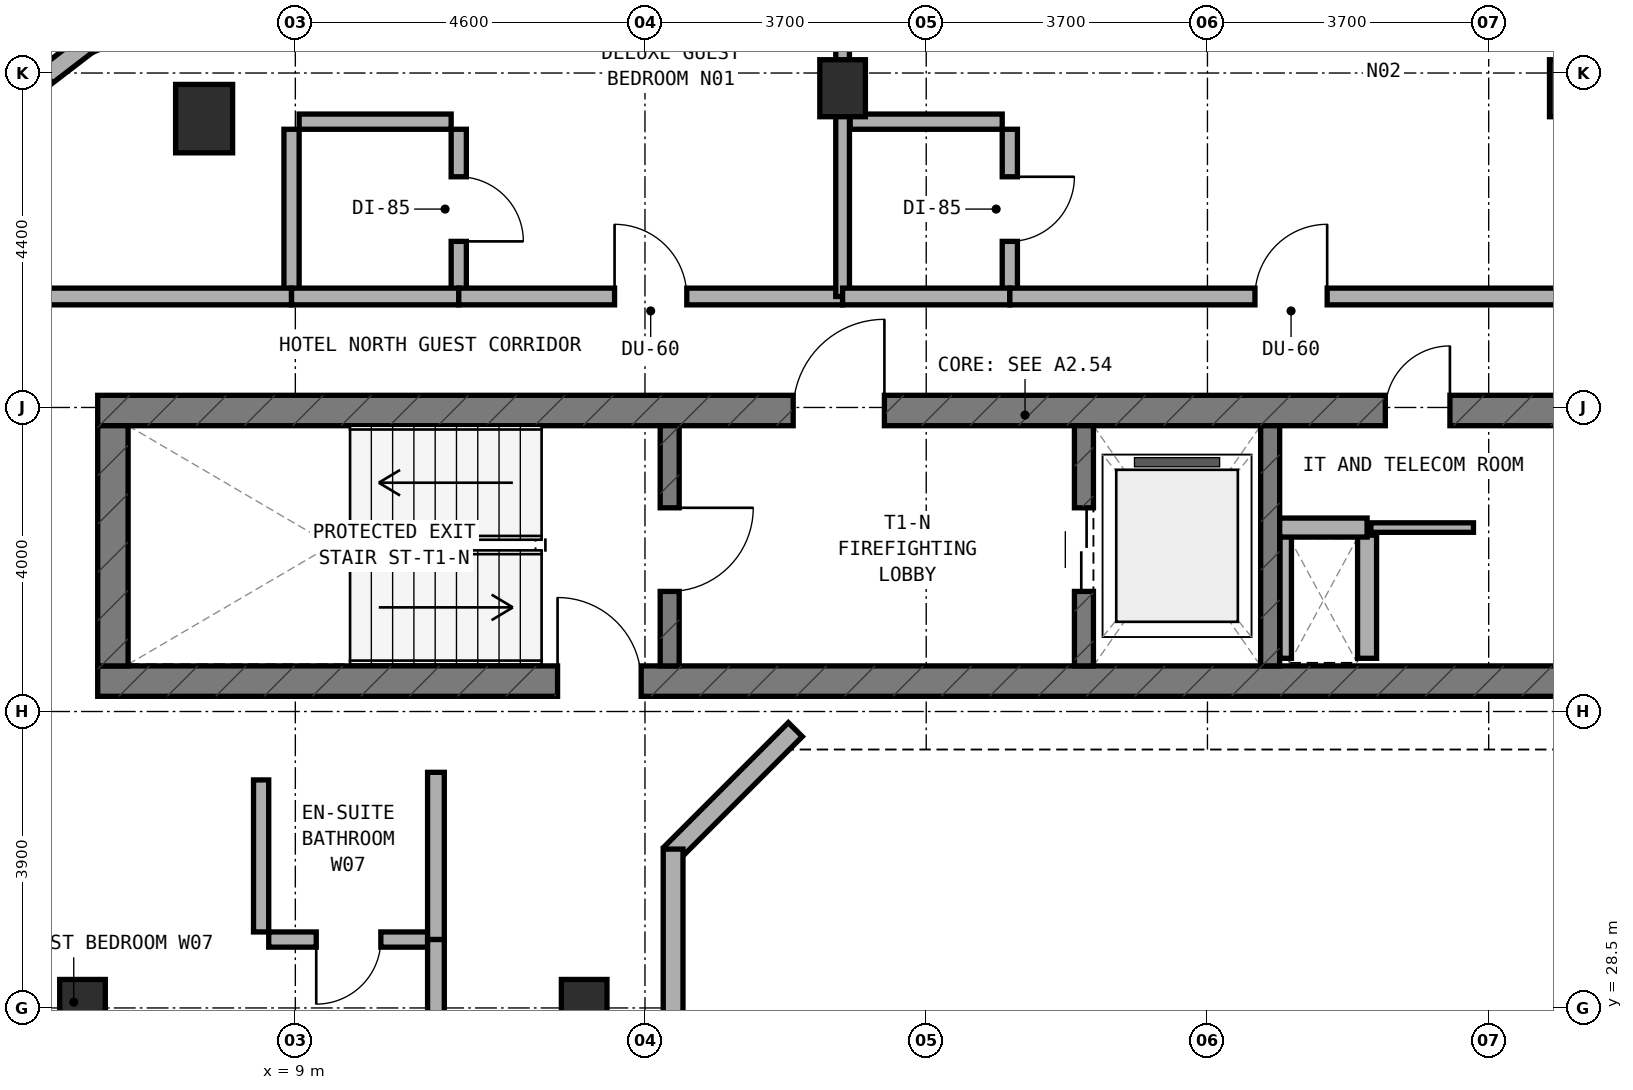
"""IFC4 building model, lengths in metres.
Left out: names, types, materials, properties, quantities, classifications, styles, units other than length and angle.
Written with IfcOpenShell. Run it as: python <this file> out.ifc"""

import sys

from ifc_helpers import new_model, si_unit, direction, frame, frame_2d, origin, origin_2d, place, context, subcontext, project, spatial, rectangle, extrude, element, fill, save


model = new_model("IFC4")
c1 = context("Model", 3, precision=1e-05, world=origin(), true_north=direction((0.0, 1.0)))
c2 = subcontext(c1, "Body", "Model", "MODEL_VIEW")
j1 = project(units=[si_unit("LENGTHUNIT", "METRE"), si_unit("PLANEANGLEUNIT", "RADIAN")], contexts=[c1])
p1 = place(None, origin())
s1 = spatial("IfcSite", under=j1, at=p1, CompositionType="ELEMENT")
p2 = place(p1, origin())
s2 = spatial("IfcBuilding", under=s1, at=p2, CompositionType="ELEMENT")
p3 = place(p2, frame((0.0, 0.0, 250.4)))
s3 = spatial("IfcBuildingStorey", under=s2, at=p3, CompositionType="ELEMENT", Elevation=250.4)
p4 = place(p3, frame((6.4, 32.8, 0.0), z_axis=(0.0, 0.0, 1.0), x_axis=(1.0, 0.0, 0.0)))
e1 = element("IfcWall", 1, at=p4, inside=s3, PredefinedType="SHEAR", context=c2, shape_type="SweptSolid", body=[
    extrude(rectangle(XDim=24.4, YDim=0.4, at=frame_2d((12.2, 0.0))), origin(), (0.0, 0.0, 1.0), 3.6),
])
p5 = place(p4, frame((6.05, 0.0, 0.0)))
e2 = element("IfcOpeningElement", 2, at=p5, cuts=e1, PredefinedType="OPENING", context=c2, shape_type="SweptSolid", body=[
    extrude(rectangle(XDim=1.1, YDim=2.15, at=frame_2d((0.55, 1.075))), frame((0.0, 0.21, 0.0), z_axis=(0.0, -1.0, 0.0), x_axis=(1.0, 0.0, 0.0)), (0.0, 0.0, 1.0), 0.42),
])
p6 = place(p3, frame((6.4, 36.36, 0.0), z_axis=(0.0, 0.0, 1.0), x_axis=(1.0, 0.0, 0.0)))
e3 = element("IfcWall", 3, at=p6, inside=s3, PredefinedType="SHEAR", context=c2, shape_type="SweptSolid", body=[
    extrude(rectangle(XDim=24.4, YDim=0.4, at=frame_2d((12.2, 0.0))), origin(), (0.0, 0.0, 1.0), 3.6),
])
p7 = place(p6, frame((9.15, 0.0, 0.0)))
e4 = element("IfcOpeningElement", 4, at=p7, cuts=e3, PredefinedType="OPENING", context=c2, shape_type="SweptSolid", body=[
    extrude(rectangle(XDim=1.2, YDim=2.15, at=frame_2d((0.6, 1.075))), frame((0.0, 0.21, 0.0), z_axis=(0.0, -1.0, 0.0), x_axis=(1.0, 0.0, 0.0)), (0.0, 0.0, 1.0), 0.42),
])
p8 = place(p6, frame((19.2, 0.0, 0.0)))
e5 = element("IfcOpeningElement", 5, at=p8, cuts=e3, PredefinedType="OPENING", context=c2, shape_type="SweptSolid", body=[
    extrude(rectangle(XDim=0.85, YDim=2.1, at=frame_2d((0.425, 1.05))), frame((0.0, 0.21, 0.0), z_axis=(0.0, -1.0, 0.0), x_axis=(1.0, 0.0, 0.0)), (0.0, 0.0, 1.0), 0.42),
])
p9 = place(p6, frame((16.94, 0.0, 0.0)))
e6 = element("IfcOpeningElement", 6, at=p9, cuts=e3, PredefinedType="OPENING", context=c2, shape_type="SweptSolid", body=[
    extrude(rectangle(XDim=0.85, YDim=2.1, at=frame_2d((0.425, 1.05))), frame((0.0, 0.21, 0.0), z_axis=(0.0, -1.0, 0.0), x_axis=(1.0, 0.0, 0.0)), (0.0, 0.0, 1.0), 0.42),
])
p10 = place(p3, frame((6.6, 33.0, 0.0), z_axis=(0.0, 0.0, 1.0), x_axis=(0.0, 1.0, 0.0)))
e7 = element("IfcWall", 7, at=p10, inside=s3, PredefinedType="SHEAR", context=c2, shape_type="SweptSolid", body=[
    extrude(rectangle(XDim=3.16, YDim=0.4, at=frame_2d((1.58, 0.0))), origin(), (0.0, 0.0, 1.0), 3.6),
])
p11 = place(p3, frame((13.925, 33.0, 0.0), z_axis=(0.0, 0.0, 1.0), x_axis=(0.0, 1.0, 0.0)))
e8 = element("IfcWall", 8, at=p11, inside=s3, PredefinedType="STANDARD", context=c2, shape_type="SweptSolid", body=[
    extrude(rectangle(XDim=3.16, YDim=0.25, at=frame_2d((1.58, 0.0))), origin(), (0.0, 0.0, 1.0), 3.32),
])
p12 = place(p11, frame((0.98, 0.0, 0.0)))
e9 = element("IfcOpeningElement", 9, at=p12, cuts=e8, PredefinedType="OPENING", context=c2, shape_type="SweptSolid", body=[
    extrude(rectangle(XDim=1.1, YDim=2.15, at=frame_2d((0.55, 1.075))), frame((0.0, 0.135, 0.0), z_axis=(0.0, -1.0, 0.0), x_axis=(1.0, 0.0, 0.0)), (0.0, 0.0, 1.0), 0.27),
])
p13 = place(p3, frame((19.375, 33.0, 0.0), z_axis=(0.0, 0.0, 1.0), x_axis=(0.0, 1.0, 0.0)))
e10 = element("IfcWall", 10, at=p13, inside=s3, PredefinedType="STANDARD", context=c2, shape_type="SweptSolid", body=[
    extrude(rectangle(XDim=3.16, YDim=0.25, at=frame_2d((1.58, 0.0))), origin(), (0.0, 0.0, 1.0), 3.32),
])
p14 = place(p13, frame((0.98, 0.0, 0.0)))
e11 = element("IfcOpeningElement", 11, at=p14, cuts=e10, PredefinedType="OPENING", context=c2, shape_type="SweptSolid", body=[
    extrude(rectangle(XDim=1.1, YDim=2.15, at=frame_2d((0.55, 1.075))), frame((0.0, 0.135, 0.0), z_axis=(0.0, -1.0, 0.0), x_axis=(1.0, 0.0, 0.0)), (0.0, 0.0, 1.0), 0.27),
])
p15 = place(p3, frame((21.825, 33.0, 0.0), z_axis=(0.0, 0.0, 1.0), x_axis=(0.0, 1.0, 0.0)))
e12 = element("IfcWall", 12, at=p15, inside=s3, PredefinedType="STANDARD", context=c2, shape_type="SweptSolid", body=[
    extrude(rectangle(XDim=3.16, YDim=0.25, at=frame_2d((1.58, 0.0))), origin(), (0.0, 0.0, 1.0), 3.32),
])
for number, where, z_axis, x_axis in (
    (13, (16.2, 40.6, 0.0), (0.0, 0.0, 1.0), (1.0, 0.0, 0.0)),
    (14, (25.8, 40.6, 0.0), (0.0, 0.0, 1.0), (1.0, 0.0, 0.0)),
    (15, (6.2, 28.5, 0.0), (0.0, 0.0, 1.0), (1.0, 0.0, 0.0)),
):
    element("IfcColumn", number, at=place(p3, frame(where, z_axis=z_axis, x_axis=x_axis)), inside=s3, PredefinedType="COLUMN", context=c2, shape_type="SweptSolid", body=[
        extrude(rectangle(XDim=0.6, YDim=0.75, at=origin_2d()), origin(), (0.0, 0.0, 1.0), 3.6),
    ])
p16 = place(p3, frame((7.8, 40.2, 0.0), z_axis=(0.0, 0.0, 1.0), x_axis=(1.0, 0.0, 0.0)))
e16 = element("IfcColumn", 16, at=p16, inside=s3, PredefinedType="COLUMN", context=c2, shape_type="SweptSolid", body=[
    extrude(rectangle(XDim=0.75, YDim=0.9, at=origin_2d()), origin(), (0.0, 0.0, 1.0), 3.6),
])
p17 = place(p3, frame((12.8, 28.5, 0.0), z_axis=(0.0, 0.0, 1.0), x_axis=(1.0, 0.0, 0.0)))
e17 = element("IfcColumn", 17, at=p17, inside=s3, PredefinedType="COLUMN", context=c2, shape_type="SweptSolid", body=[
    extrude(rectangle(XDim=0.6, YDim=0.75, at=origin_2d()), origin(), (0.0, 0.0, 1.0), 3.6),
])
p18 = place(p3, frame((6.997, 41.488, 0.0), z_axis=(0.0, 0.0, 1.0), x_axis=(-0.923681457047, -0.383161279238, 0.0)))
e18 = element("IfcWall", 18, at=p18, inside=s3, PredefinedType="STANDARD", context=c2, shape_type="SweptSolid", body=[
    extrude(rectangle(XDim=0.799, YDim=0.26, at=frame_2d((0.399, 0.0))), origin(), (0.0, 0.0, 1.0), 3.32),
])
for number, where, z_axis, x_axis in (
    (19, (6.299, 41.21, 0.0), (0.0, 0.0, 1.0), (-0.793, -0.609, 0.0)),
    (20, (5.697, 40.762, 0.0), (0.0, 0.0, 1.0), (-0.609, -0.793, 0.0)),
):
    element("IfcWall", number, at=place(p3, frame(where, z_axis=z_axis, x_axis=x_axis)), inside=s3, PredefinedType="STANDARD", context=c2, shape_type="SweptSolid", body=[
        extrude(rectangle(XDim=0.798, YDim=0.26, at=frame_2d((0.399, 0.0))), origin(), (0.0, 0.0, 1.0), 3.32),
    ])
p19 = place(p3, frame((15.578, 32.162, 0.0), z_axis=(0.0, 0.0, 1.0), x_axis=(-0.707053950914, -0.707159607512, 0.0)))
e21 = element("IfcWall", 21, at=p19, inside=s3, PredefinedType="STANDARD", context=c2, shape_type="SweptSolid", body=[
    extrude(rectangle(XDim=2.311, YDim=0.26, at=frame_2d((1.155, 0.0))), origin(), (0.0, 0.0, 1.0), 3.32),
])
p20 = place(p3, frame((13.97, 30.59, 0.0), z_axis=(0.0, 0.0, 1.0), x_axis=(0.0, -1.0, 0.0)))
e22 = element("IfcWall", 22, at=p20, inside=s3, PredefinedType="STANDARD", context=c2, shape_type="SweptSolid", body=[
    extrude(rectangle(XDim=11.18, YDim=0.26, at=frame_2d((5.59, 0.0))), origin(), (0.0, 0.0, 1.0), 3.32),
])
p21 = place(p20, frame((4.69, 0.0, 0.85)))
e23 = element("IfcOpeningElement", 23, at=p21, cuts=e22, PredefinedType="OPENING", context=c2, shape_type="SweptSolid", body=[
    extrude(rectangle(XDim=1.8, YDim=1.5, at=frame_2d((0.9, 0.75))), frame((0.0, 0.14, 0.0), z_axis=(0.0, -1.0, 0.0), x_axis=(1.0, 0.0, 0.0)), (0.0, 0.0, 1.0), 0.28),
])
p22 = place(p3, frame((22.03, 33.1, 0.0), z_axis=(0.0, 0.0, 1.0), x_axis=(0.0, 1.0, 0.0)))
e24 = element("IfcWall", 24, at=p22, inside=s3, PredefinedType="PARTITIONING", context=c2, shape_type="SweptSolid", body=[
    extrude(rectangle(XDim=1.62, YDim=0.15, at=frame_2d((0.81, 0.0))), origin(), (0.0, 0.0, 1.0), 3.32),
])
p23 = place(p3, frame((23.1, 33.1, 0.0), z_axis=(0.0, 0.0, 1.0), x_axis=(0.0, 1.0, 0.0)))
e25 = element("IfcWall", 25, at=p23, inside=s3, PredefinedType="SOLIDWALL", context=c2, shape_type="SweptSolid", body=[
    extrude(rectangle(XDim=1.62, YDim=0.25, at=frame_2d((0.81, 0.0))), origin(), (0.0, 0.0, 1.0), 3.32),
])
p24 = place(p3, frame((21.95, 34.82, 0.0), z_axis=(0.0, 0.0, 1.0), x_axis=(1.0, 0.0, 0.0)))
e26 = element("IfcWall", 26, at=p24, inside=s3, PredefinedType="SOLIDWALL", context=c2, shape_type="SweptSolid", body=[
    extrude(rectangle(XDim=1.15, YDim=0.25, at=frame_2d((0.575, 0.0))), origin(), (0.0, 0.0, 1.0), 3.32),
])
p25 = place(p3, frame((23.15, 34.82, 0.0), z_axis=(0.0, 0.0, 1.0), x_axis=(1.0, 0.0, 0.0)))
e27 = element("IfcWall", 27, at=p25, inside=s3, PredefinedType="PARTITIONING", context=c2, shape_type="SweptSolid", body=[
    extrude(rectangle(XDim=1.35, YDim=0.125, at=frame_2d((0.675, 0.0))), origin(), (0.0, 0.0, 1.0), 3.32),
])
p26 = place(p3, frame((11.15, 37.96, 0.0), z_axis=(0.0, 0.0, 1.0), x_axis=(0.0, 1.0, 0.0)))
e28 = element("IfcWall", 28, at=p26, inside=s3, PredefinedType="PLUMBINGWALL", context=c2, shape_type="SweptSolid", body=[
    extrude(rectangle(XDim=2.1, YDim=0.2, at=frame_2d((1.05, 0.0))), origin(), (0.0, 0.0, 1.0), 3.055),
])
p27 = place(p26, frame((0.625, 0.0, 0.0)))
e29 = element("IfcOpeningElement", 29, at=p27, cuts=e28, PredefinedType="OPENING", context=c2, shape_type="SweptSolid", body=[
    extrude(rectangle(XDim=0.85, YDim=2.1, at=frame_2d((0.425, 1.05))), frame((0.0, 0.11, 0.0), z_axis=(0.0, -1.0, 0.0), x_axis=(1.0, 0.0, 0.0)), (0.0, 0.0, 1.0), 0.22),
])
p28 = place(p3, frame((9.05, 40.16, 0.0), z_axis=(0.0, 0.0, 1.0), x_axis=(1.0, 0.0, 0.0)))
e30 = element("IfcWall", 30, at=p28, inside=s3, PredefinedType="PLUMBINGWALL", context=c2, shape_type="SweptSolid", body=[
    extrude(rectangle(XDim=2.0, YDim=0.2, at=frame_2d((1.0, 0.0))), origin(), (0.0, 0.0, 1.0), 3.015),
])
p29 = place(p3, frame((8.95, 37.96, 0.0), z_axis=(0.0, 0.0, 1.0), x_axis=(0.0, 1.0, 0.0)))
e31 = element("IfcWall", 31, at=p29, inside=s3, PredefinedType="PLUMBINGWALL", context=c2, shape_type="SweptSolid", body=[
    extrude(rectangle(XDim=2.1, YDim=0.2, at=frame_2d((1.05, 0.0))), origin(), (0.0, 0.0, 1.0), 3.055),
])
p30 = place(p3, frame((3.36, 37.86, 0.0), z_axis=(0.0, 0.0, 1.0), x_axis=(1.0, 0.0, 0.0)))
e32 = element("IfcWall", 32, at=p30, inside=s3, PredefinedType="SOLIDWALL", context=c2, shape_type="SweptSolid", body=[
    extrude(rectangle(XDim=5.59, YDim=0.22, at=frame_2d((2.795, 0.0))), origin(), (0.0, 0.0, 1.0), 2.745),
])
p31 = place(p3, frame((8.95, 37.86, 0.0), z_axis=(0.0, 0.0, 1.0), x_axis=(1.0, 0.0, 0.0)))
e33 = element("IfcWall", 33, at=p31, inside=s3, PredefinedType="SOLIDWALL", context=c2, shape_type="SweptSolid", body=[
    extrude(rectangle(XDim=2.2, YDim=0.22, at=frame_2d((1.1, 0.0))), origin(), (0.0, 0.0, 1.0), 3.32),
])
p32 = place(p3, frame((11.15, 37.86, 0.0), z_axis=(0.0, 0.0, 1.0), x_axis=(1.0, 0.0, 0.0)))
e34 = element("IfcWall", 34, at=p32, inside=s3, PredefinedType="SOLIDWALL", context=c2, shape_type="SweptSolid", body=[
    extrude(rectangle(XDim=5.05, YDim=0.22, at=frame_2d((2.525, 0.0))), origin(), (0.0, 0.0, 1.0), 2.745),
])
p33 = place(p32, frame((2.05, 0.0, 0.0)))
e35 = element("IfcOpeningElement", 35, at=p33, cuts=e34, PredefinedType="OPENING", context=c2, shape_type="SweptSolid", body=[
    extrude(rectangle(XDim=0.95, YDim=2.1, at=frame_2d((0.475, 1.05))), frame((0.0, 0.12, 0.0), z_axis=(0.0, -1.0, 0.0), x_axis=(1.0, 0.0, 0.0)), (0.0, 0.0, 1.0), 0.24),
])
p34 = place(p3, frame((16.2, 37.86, 0.0), z_axis=(0.0, 0.0, 1.0), x_axis=(0.0, 1.0, 0.0)))
e36 = element("IfcWall", 36, at=p34, inside=s3, PredefinedType="SOLIDWALL", context=c2, shape_type="SweptSolid", body=[
    extrude(rectangle(XDim=5.28, YDim=0.18, at=frame_2d((2.64, 0.0))), origin(), (0.0, 0.0, 1.0), 2.745),
])
p35 = place(p3, frame((18.4, 37.96, 0.0), z_axis=(0.0, 0.0, 1.0), x_axis=(0.0, 1.0, 0.0)))
e37 = element("IfcWall", 37, at=p35, inside=s3, PredefinedType="PLUMBINGWALL", context=c2, shape_type="SweptSolid", body=[
    extrude(rectangle(XDim=2.1, YDim=0.2, at=frame_2d((1.05, 0.0))), origin(), (0.0, 0.0, 1.0), 3.055),
])
p36 = place(p35, frame((0.625, 0.0, 0.0)))
e38 = element("IfcOpeningElement", 38, at=p36, cuts=e37, PredefinedType="OPENING", context=c2, shape_type="SweptSolid", body=[
    extrude(rectangle(XDim=0.85, YDim=2.1, at=frame_2d((0.425, 1.05))), frame((0.0, 0.11, 0.0), z_axis=(0.0, -1.0, 0.0), x_axis=(1.0, 0.0, 0.0)), (0.0, 0.0, 1.0), 0.22),
])
p37 = place(p3, frame((16.3, 40.16, 0.0), z_axis=(0.0, 0.0, 1.0), x_axis=(1.0, 0.0, 0.0)))
e39 = element("IfcWall", 39, at=p37, inside=s3, PredefinedType="PLUMBINGWALL", context=c2, shape_type="SweptSolid", body=[
    extrude(rectangle(XDim=2.0, YDim=0.2, at=frame_2d((1.0, 0.0))), origin(), (0.0, 0.0, 1.0), 3.32),
])
p38 = place(p3, frame((16.2, 37.86, 0.0), z_axis=(0.0, 0.0, 1.0), x_axis=(1.0, 0.0, 0.0)))
e40 = element("IfcWall", 40, at=p38, inside=s3, PredefinedType="SOLIDWALL", context=c2, shape_type="SweptSolid", body=[
    extrude(rectangle(XDim=2.2, YDim=0.22, at=frame_2d((1.1, 0.0))), origin(), (0.0, 0.0, 1.0), 2.745),
])
p39 = place(p3, frame((18.4, 37.86, 0.0), z_axis=(0.0, 0.0, 1.0), x_axis=(1.0, 0.0, 0.0)))
e41 = element("IfcWall", 41, at=p39, inside=s3, PredefinedType="SOLIDWALL", context=c2, shape_type="SweptSolid", body=[
    extrude(rectangle(XDim=7.4, YDim=0.22, at=frame_2d((3.7, 0.0))), origin(), (0.0, 0.0, 1.0), 2.745),
])
p40 = place(p39, frame((3.225, 0.0, 0.0)))
e42 = element("IfcOpeningElement", 42, at=p40, cuts=e41, PredefinedType="OPENING", context=c2, shape_type="SweptSolid", body=[
    extrude(rectangle(XDim=0.95, YDim=2.1, at=frame_2d((0.475, 1.05))), frame((0.0, 0.12, 0.0), z_axis=(0.0, -1.0, 0.0), x_axis=(1.0, 0.0, 0.0)), (0.0, 0.0, 1.0), 0.24),
])
p41 = place(p3, frame((8.65, 29.4, 0.0), z_axis=(0.0, 0.0, 1.0), x_axis=(1.0, 0.0, 0.0)))
e43 = element("IfcWall", 43, at=p41, inside=s3, PredefinedType="PLUMBINGWALL", context=c2, shape_type="SweptSolid", body=[
    extrude(rectangle(XDim=2.1, YDim=0.2, at=frame_2d((1.05, 0.0))), origin(), (0.0, 0.0, 1.0), 3.32),
])
p42 = place(p41, frame((0.625, 0.0, 0.0)))
e44 = element("IfcOpeningElement", 44, at=p42, cuts=e43, PredefinedType="OPENING", context=c2, shape_type="SweptSolid", body=[
    extrude(rectangle(XDim=0.85, YDim=2.1, at=frame_2d((0.425, 1.05))), frame((0.0, 0.11, 0.0), z_axis=(0.0, -1.0, 0.0), x_axis=(1.0, 0.0, 0.0)), (0.0, 0.0, 1.0), 0.22),
])
p43 = place(p3, frame((8.55, 29.5, 0.0), z_axis=(0.0, 0.0, 1.0), x_axis=(0.0, 1.0, 0.0)))
e45 = element("IfcWall", 45, at=p43, inside=s3, PredefinedType="PLUMBINGWALL", context=c2, shape_type="SweptSolid", body=[
    extrude(rectangle(XDim=2.0, YDim=0.2, at=frame_2d((1.0, 0.0))), origin(), (0.0, 0.0, 1.0), 3.32),
])
p44 = place(p3, frame((10.85, 29.4, 0.0), z_axis=(0.0, 0.0, 1.0), x_axis=(0.0, 1.0, 0.0)))
e46 = element("IfcWall", 46, at=p44, inside=s3, PredefinedType="SOLIDWALL", context=c2, shape_type="SweptSolid", body=[
    extrude(rectangle(XDim=2.2, YDim=0.22, at=frame_2d((1.1, 0.0))), origin(), (0.0, 0.0, 1.0), 3.32),
])
p45 = place(p3, frame((10.85, 25.77, 0.0), z_axis=(0.0, 0.0, 1.0), x_axis=(0.0, 1.0, 0.0)))
e47 = element("IfcWall", 47, at=p45, inside=s3, PredefinedType="SOLIDWALL", context=c2, shape_type="SweptSolid", body=[
    extrude(rectangle(XDim=3.63, YDim=0.22, at=frame_2d((1.815, 0.0))), origin(), (0.0, 0.0, 1.0), 2.745),
])
p46 = place(p45, frame((1.34, 0.0, 0.0)))
e48 = element("IfcOpeningElement", 48, at=p46, cuts=e47, PredefinedType="OPENING", context=c2, shape_type="SweptSolid", body=[
    extrude(rectangle(XDim=0.95, YDim=2.1, at=frame_2d((0.475, 1.05))), frame((0.0, 0.12, 0.0), z_axis=(0.0, -1.0, 0.0), x_axis=(1.0, 0.0, 0.0)), (0.0, 0.0, 1.0), 0.24),
])
p47 = place(p12, frame((1.1, 0.0, 0.0), z_axis=(0.0, 0.0, 1.0), x_axis=(-1.0, 0.0, 0.0)))
e49 = element("IfcDoor", 49, at=p47, inside=s3, OperationType="SINGLE_SWING_LEFT", PredefinedType="DOOR", context=c2, shape_type="SweptSolid", body=[
    extrude(rectangle(XDim=1.1, YDim=2.15, at=frame_2d((0.55, 1.075))), frame((0.0, 0.025, 0.0), z_axis=(0.0, -1.0, 0.0), x_axis=(1.0, 0.0, 0.0)), (0.0, 0.0, 1.0), 0.05),
])
fill(e9, e49)
p48 = place(p7, origin())
e50 = element("IfcDoor", 50, at=p48, inside=s3, OperationType="SINGLE_SWING_RIGHT", PredefinedType="DOOR", context=c2, shape_type="SweptSolid", body=[
    extrude(rectangle(XDim=1.2, YDim=2.15, at=frame_2d((0.6, 1.075))), frame((0.0, 0.025, 0.0), z_axis=(0.0, -1.0, 0.0), x_axis=(1.0, 0.0, 0.0)), (0.0, 0.0, 1.0), 0.05),
])
fill(e4, e50)
p49 = place(p14, origin())
e51 = element("IfcDoor", 51, at=p49, inside=s3, OperationType="DOUBLE_DOOR_SLIDING", PredefinedType="DOOR", context=c2, shape_type="SweptSolid", body=[
    extrude(rectangle(XDim=1.1, YDim=2.15, at=frame_2d((0.55, 1.075))), frame((0.0, 0.025, 0.0), z_axis=(0.0, -1.0, 0.0), x_axis=(1.0, 0.0, 0.0)), (0.0, 0.0, 1.0), 0.05),
])
fill(e11, e51)
p50 = place(p9, origin())
e52 = element("IfcDoor", 52, at=p50, inside=s3, OperationType="SINGLE_SWING_RIGHT", PredefinedType="DOOR", context=c2, shape_type="SweptSolid", body=[
    extrude(rectangle(XDim=0.85, YDim=2.1, at=frame_2d((0.425, 1.05))), frame((0.0, 0.025, 0.0), z_axis=(0.0, -1.0, 0.0), x_axis=(1.0, 0.0, 0.0)), (0.0, 0.0, 1.0), 0.05),
])
fill(e6, e52)
p51 = place(p5, origin())
e53 = element("IfcDoor", 53, at=p51, inside=s3, OperationType="SINGLE_SWING_LEFT", PredefinedType="DOOR", context=c2, shape_type="SweptSolid", body=[
    extrude(rectangle(XDim=1.1, YDim=2.15, at=frame_2d((0.55, 1.075))), frame((0.0, 0.025, 0.0), z_axis=(0.0, -1.0, 0.0), x_axis=(1.0, 0.0, 0.0)), (0.0, 0.0, 1.0), 0.05),
])
fill(e2, e53)
p52 = place(p27, frame((0.85, 0.0, 0.0), z_axis=(0.0, 0.0, 1.0), x_axis=(-1.0, 0.0, 0.0)))
e54 = element("IfcDoor", 54, at=p52, inside=s3, OperationType="SINGLE_SWING_RIGHT", PredefinedType="DOOR", context=c2, shape_type="SweptSolid", body=[
    extrude(rectangle(XDim=0.85, YDim=2.1, at=frame_2d((0.425, 1.05))), frame((0.0, 0.025, 0.0), z_axis=(0.0, -1.0, 0.0), x_axis=(1.0, 0.0, 0.0)), (0.0, 0.0, 1.0), 0.05),
])
fill(e29, e54)
p53 = place(p33, origin())
e55 = element("IfcDoor", 55, at=p53, inside=s3, OperationType="SINGLE_SWING_LEFT", PredefinedType="DOOR", context=c2, shape_type="SweptSolid", body=[
    extrude(rectangle(XDim=0.95, YDim=2.1, at=frame_2d((0.475, 1.05))), frame((0.0, 0.025, 0.0), z_axis=(0.0, -1.0, 0.0), x_axis=(1.0, 0.0, 0.0)), (0.0, 0.0, 1.0), 0.05),
])
fill(e35, e55)
p54 = place(p36, frame((0.85, 0.0, 0.0), z_axis=(0.0, 0.0, 1.0), x_axis=(-1.0, 0.0, 0.0)))
e56 = element("IfcDoor", 56, at=p54, inside=s3, OperationType="SINGLE_SWING_LEFT", PredefinedType="DOOR", context=c2, shape_type="SweptSolid", body=[
    extrude(rectangle(XDim=0.85, YDim=2.1, at=frame_2d((0.425, 1.05))), frame((0.0, 0.025, 0.0), z_axis=(0.0, -1.0, 0.0), x_axis=(1.0, 0.0, 0.0)), (0.0, 0.0, 1.0), 0.05),
])
fill(e38, e56)
p55 = place(p40, origin())
e57 = element("IfcDoor", 57, at=p55, inside=s3, OperationType="SINGLE_SWING_RIGHT", PredefinedType="DOOR", context=c2, shape_type="SweptSolid", body=[
    extrude(rectangle(XDim=0.95, YDim=2.1, at=frame_2d((0.475, 1.05))), frame((0.0, 0.025, 0.0), z_axis=(0.0, -1.0, 0.0), x_axis=(1.0, 0.0, 0.0)), (0.0, 0.0, 1.0), 0.05),
])
fill(e42, e57)
p56 = place(p42, frame((0.85, 0.0, 0.0), z_axis=(0.0, 0.0, 1.0), x_axis=(-1.0, 0.0, 0.0)))
e58 = element("IfcDoor", 58, at=p56, inside=s3, OperationType="SINGLE_SWING_RIGHT", PredefinedType="DOOR", context=c2, shape_type="SweptSolid", body=[
    extrude(rectangle(XDim=0.85, YDim=2.1, at=frame_2d((0.425, 1.05))), frame((0.0, 0.025, 0.0), z_axis=(0.0, -1.0, 0.0), x_axis=(1.0, 0.0, 0.0)), (0.0, 0.0, 1.0), 0.05),
])
fill(e44, e58)
save(model, sys.argv[1])
